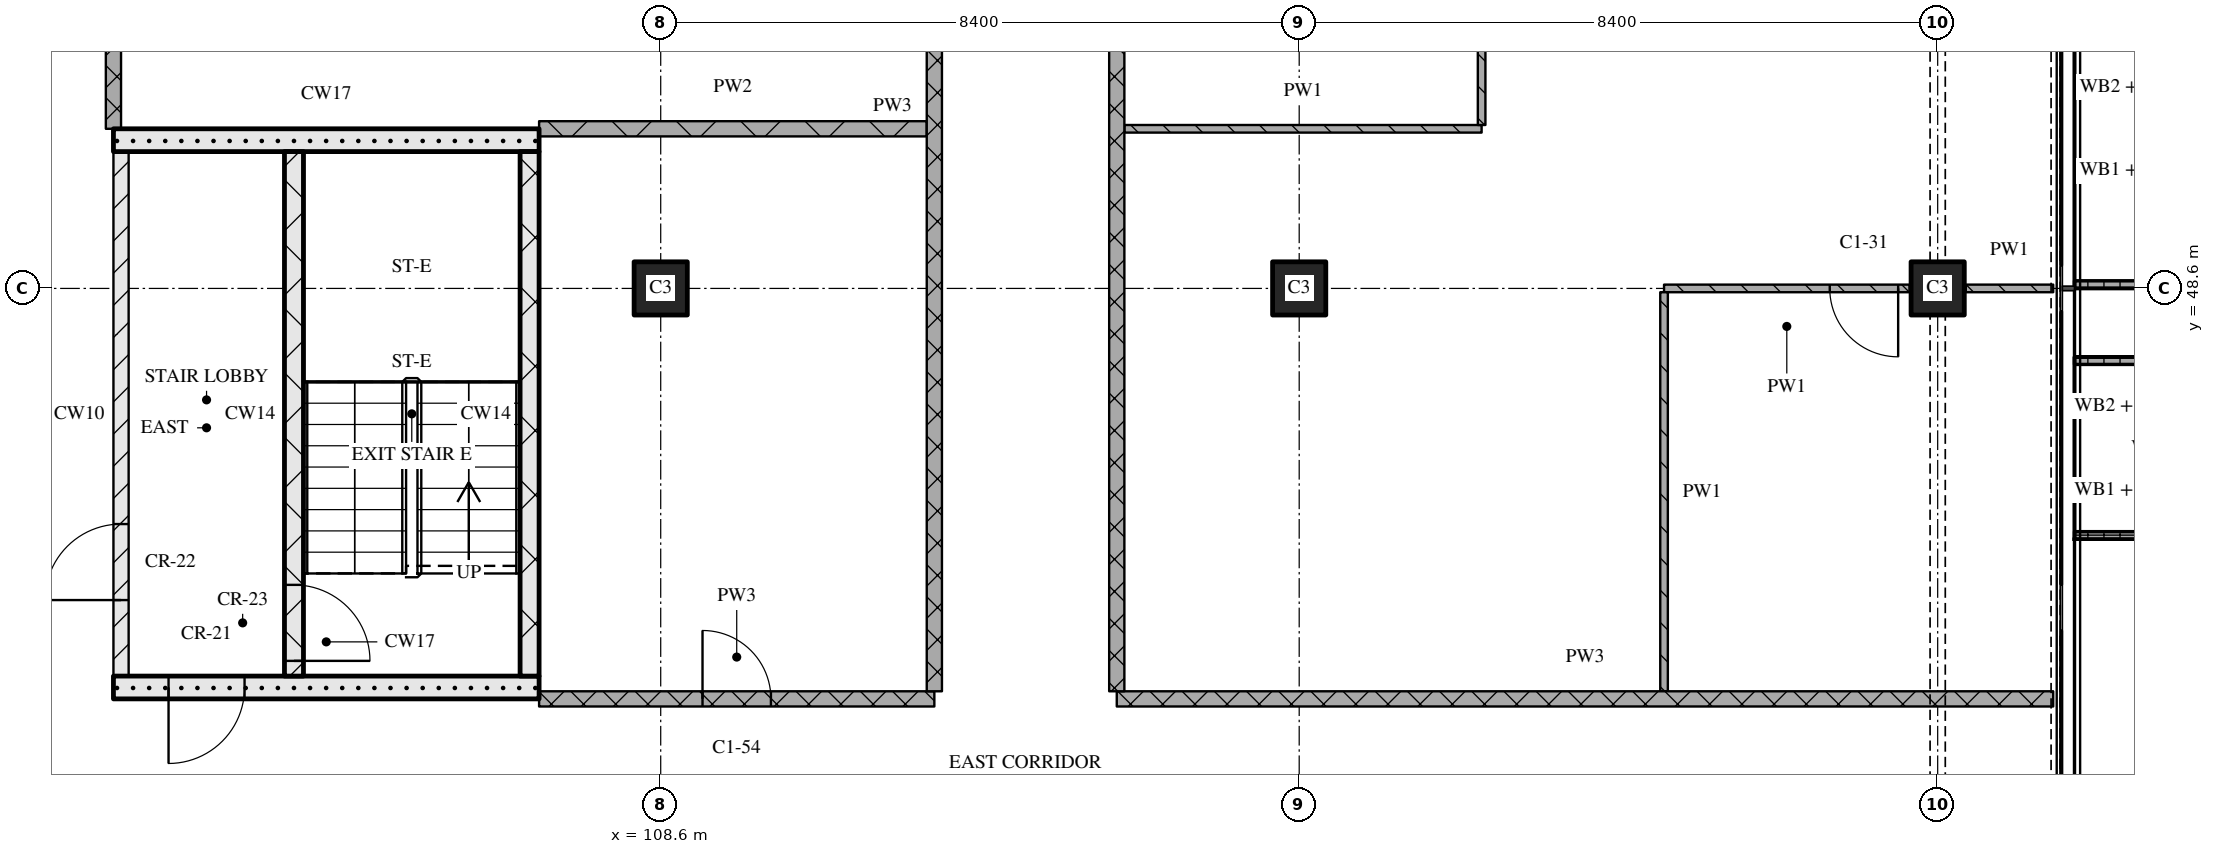
"""IFC4 building model, lengths in metres.
Left out: names, types, materials, properties, quantities, classifications, styles, units other than length and angle.
Written with IfcOpenShell. Run it as: python <this file> out.ifc"""

import sys

from ifc_helpers import new_model, si_unit, direction, frame, frame_2d, origin, origin_2d, place, context, subcontext, project, spatial, polyline, rectangle, outline, extrude, element, fill, save


model = new_model("IFC4")
c1 = context("Model", 3, precision=1e-05, world=origin(), true_north=direction((0.0, 1.0)))
c2 = subcontext(c1, "Body", "Model", "MODEL_VIEW")
j1 = project(units=[si_unit("LENGTHUNIT", "METRE"), si_unit("PLANEANGLEUNIT", "RADIAN")], contexts=[c1])
p1 = place(None, origin())
s1 = spatial("IfcSite", under=j1, at=p1, CompositionType="ELEMENT")
p2 = place(p1, origin())
s2 = spatial("IfcBuilding", under=s1, at=p2, CompositionType="ELEMENT")
p3 = place(p2, frame((0.0, 0.0, 154.65)))
s3 = spatial("IfcBuildingStorey", under=s2, at=p3, CompositionType="ELEMENT", Elevation=154.65)
for number, where, z_axis, x_axis in (
    (1, (108.6, 48.6, 0.0), (0.0, 0.0, 1.0), (1.0, 0.0, 0.0)),
    (2, (117.0, 48.6, 0.0), (0.0, 0.0, 1.0), (1.0, 0.0, 0.0)),
    (3, (125.4, 48.6, 0.0), (0.0, 0.0, 1.0), (1.0, 0.0, 0.0)),
):
    element("IfcColumn", number, at=place(p3, frame(where, z_axis=z_axis, x_axis=x_axis)), inside=s3, PredefinedType="COLUMN", context=c2, shape_type="SweptSolid", body=[
        extrude(rectangle(XDim=0.7, YDim=0.7, at=origin_2d()), origin(), (0.0, 0.0, 1.0), 3.6),
    ])
p4 = place(p3, origin())
e4 = element("IfcWall", 4, at=p4, inside=s3, PredefinedType="SOLIDWALL", context=c2, shape_type="SweptSolid", body=[
    extrude(outline(polyline([(127.2, 45.3), (127.2, 45.4), (128.7, 45.4), (128.7, 47.6), (127.2, 47.6), (127.2, 47.7), (128.8, 47.7), (128.8, 45.3), (127.2, 45.3)])), origin(), (0.0, 0.0, 1.0), 1.0),
])
p5 = place(p3, origin())
e5 = element("IfcWall", 5, at=p5, inside=s3, PredefinedType="SOLIDWALL", context=c2, shape_type="SweptSolid", body=[
    extrude(outline(polyline([(127.2, 48.6), (127.2, 48.7), (128.833, 48.7), (128.833, 52.7), (127.2, 52.7), (127.2, 52.8), (128.933, 52.8), (128.933, 48.6), (127.2, 48.6)])), origin(), (0.0, 0.0, 1.0), 1.0),
])
p6 = place(p3, frame((101.4, 43.35, 0.0), z_axis=(0.0, 0.0, 1.0), x_axis=(1.0, 0.0, 0.0)))
e6 = element("IfcWall", 6, at=p6, inside=s3, PredefinedType="SOLIDWALL", context=c2, shape_type="SweptSolid", body=[
    extrude(rectangle(XDim=5.6, YDim=0.3, at=frame_2d((2.8, 0.0))), origin(), (0.0, 0.0, 1.0), 3.32),
])
p7 = place(p6, frame((0.725, 0.0, 0.0)))
e7 = element("IfcOpeningElement", 7, at=p7, cuts=e6, PredefinedType="OPENING", context=c2, shape_type="SweptSolid", body=[
    extrude(rectangle(XDim=1.0, YDim=2.1, at=frame_2d((0.5, 1.05))), frame((0.0, 0.16, 0.0), z_axis=(0.0, -1.0, 0.0), x_axis=(1.0, 0.0, 0.0)), (0.0, 0.0, 1.0), 0.32),
])
p8 = place(p3, frame((101.5, 43.5, 0.0), z_axis=(0.0, 0.0, 1.0), x_axis=(0.0, 1.0, 0.0)))
e8 = element("IfcWall", 8, at=p8, inside=s3, PredefinedType="PARTITIONING", context=c2, shape_type="SweptSolid", body=[
    extrude(rectangle(XDim=6.9, YDim=0.2, at=frame_2d((3.45, 0.0))), origin(), (0.0, 0.0, 1.0), 3.32),
])
p9 = place(p8, frame((1.0, 0.0, 0.0)))
e9 = element("IfcOpeningElement", 9, at=p9, cuts=e8, PredefinedType="OPENING", context=c2, shape_type="SweptSolid", body=[
    extrude(rectangle(XDim=1.0, YDim=2.1, at=frame_2d((0.5, 1.05))), frame((0.0, 0.11, 0.0), z_axis=(0.0, -1.0, 0.0), x_axis=(1.0, 0.0, 0.0)), (0.0, 0.0, 1.0), 0.22),
])
p10 = place(p3, frame((103.775, 43.5, 0.0), z_axis=(0.0, 0.0, 1.0), x_axis=(0.0, 1.0, 0.0)))
e10 = element("IfcWall", 10, at=p10, inside=s3, PredefinedType="SOLIDWALL", context=c2, shape_type="SweptSolid", body=[
    extrude(rectangle(XDim=6.9, YDim=0.25, at=frame_2d((3.45, 0.0))), origin(), (0.0, 0.0, 1.0), 3.32),
])
p11 = place(p10, frame((0.2, 0.0, 0.0)))
e11 = element("IfcOpeningElement", 11, at=p11, cuts=e10, PredefinedType="OPENING", context=c2, shape_type="SweptSolid", body=[
    extrude(rectangle(XDim=1.0, YDim=2.1, at=frame_2d((0.5, 1.05))), frame((0.0, 0.135, 0.0), z_axis=(0.0, -1.0, 0.0), x_axis=(1.0, 0.0, 0.0)), (0.0, 0.0, 1.0), 0.27),
])
p12 = place(p3, frame((106.875, 43.5, 0.0), z_axis=(0.0, 0.0, 1.0), x_axis=(0.0, 1.0, 0.0)))
e12 = element("IfcWall", 12, at=p12, inside=s3, PredefinedType="SOLIDWALL", context=c2, shape_type="SweptSolid", body=[
    extrude(rectangle(XDim=6.9, YDim=0.25, at=frame_2d((3.45, 0.0))), origin(), (0.0, 0.0, 1.0), 3.32),
])
p13 = place(p3, frame((101.4, 50.55, 0.0), z_axis=(0.0, 0.0, 1.0), x_axis=(1.0, 0.0, 0.0)))
e13 = element("IfcWall", 13, at=p13, inside=s3, PredefinedType="SOLIDWALL", context=c2, shape_type="SweptSolid", body=[
    extrude(rectangle(XDim=5.6, YDim=0.3, at=frame_2d((2.8, 0.0))), origin(), (0.0, 0.0, 1.0), 3.32),
])
p14 = place(p3, frame((107.0, 43.2, 0.0), z_axis=(0.0, 0.0, 1.0), x_axis=(1.0, 0.0, 0.0)))
e14 = element("IfcWall", 14, at=p14, inside=s3, PredefinedType="PARTITIONING", context=c2, shape_type="SweptSolid", body=[
    extrude(rectangle(XDim=5.2, YDim=0.2, at=frame_2d((2.6, 0.0))), origin(), (0.0, 0.0, 1.0), 3.32),
])
p15 = place(p14, frame((2.15, 0.0, 0.0)))
e15 = element("IfcOpeningElement", 15, at=p15, cuts=e14, PredefinedType="OPENING", context=c2, shape_type="SweptSolid", body=[
    extrude(rectangle(XDim=0.9, YDim=2.1, at=frame_2d((0.45, 1.05))), frame((0.0, 0.11, 0.0), z_axis=(0.0, -1.0, 0.0), x_axis=(1.0, 0.0, 0.0)), (0.0, 0.0, 1.0), 0.22),
])
p16 = place(p3, frame((114.6, 43.2, 0.0), z_axis=(0.0, 0.0, 1.0), x_axis=(1.0, 0.0, 0.0)))
e16 = element("IfcWall", 16, at=p16, inside=s3, PredefinedType="PARTITIONING", context=c2, shape_type="SweptSolid", body=[
    extrude(rectangle(XDim=12.32, YDim=0.2, at=frame_2d((6.16, 0.0))), origin(), (0.0, 0.0, 1.0), 3.32),
])
p17 = place(p3, frame((125.03, 48.6, 0.0), z_axis=(0.0, 0.0, 1.0), x_axis=(-1.0, 0.0, 0.0)))
e17 = element("IfcWall", 17, at=p17, inside=s3, PredefinedType="PARTITIONING", context=c2, shape_type="SweptSolid", body=[
    extrude(rectangle(XDim=3.23, YDim=0.1, at=frame_2d((1.615, 0.0))), origin(), (0.0, 0.0, 1.0), 3.32),
])
p18 = place(p17, frame((0.15, 0.0, 0.0)))
e18 = element("IfcOpeningElement", 18, at=p18, cuts=e17, PredefinedType="OPENING", context=c2, shape_type="SweptSolid", body=[
    extrude(rectangle(XDim=0.9, YDim=2.1, at=frame_2d((0.45, 1.05))), frame((0.0, 0.06, 0.0), z_axis=(0.0, -1.0, 0.0), x_axis=(1.0, 0.0, 0.0)), (0.0, 0.0, 1.0), 0.12),
])
p19 = place(p3, frame((125.77, 48.6, 0.0), z_axis=(0.0, 0.0, 1.0), x_axis=(1.0, 0.0, 0.0)))
e19 = element("IfcWall", 19, at=p19, inside=s3, PredefinedType="PARTITIONING", context=c2, shape_type="SweptSolid", body=[
    extrude(rectangle(XDim=1.15, YDim=0.1, at=frame_2d((0.575, 0.0))), origin(), (0.0, 0.0, 1.0), 3.32),
])
p20 = place(p3, frame((107.0, 50.7, 0.0), z_axis=(0.0, 0.0, 1.0), x_axis=(1.0, 0.0, 0.0)))
e20 = element("IfcWall", 20, at=p20, inside=s3, PredefinedType="PARTITIONING", context=c2, shape_type="SweptSolid", body=[
    extrude(rectangle(XDim=5.1, YDim=0.2, at=frame_2d((2.55, 0.0))), origin(), (0.0, 0.0, 1.0), 3.32),
])
p21 = place(p3, frame((114.7, 50.7, 0.0), z_axis=(0.0, 0.0, 1.0), x_axis=(1.0, 0.0, 0.0)))
e21 = element("IfcWall", 21, at=p21, inside=s3, PredefinedType="PARTITIONING", context=c2, shape_type="SweptSolid", body=[
    extrude(rectangle(XDim=4.7, YDim=0.1, at=frame_2d((2.35, 0.0))), origin(), (0.0, 0.0, 1.0), 3.32),
])
p22 = place(p3, frame((101.4, 58.7, 0.0), z_axis=(0.0, 0.0, 1.0), x_axis=(0.0, -1.0, 0.0)))
e22 = element("IfcWall", 22, at=p22, inside=s3, PredefinedType="PARTITIONING", context=c2, shape_type="SweptSolid", body=[
    extrude(rectangle(XDim=8.0, YDim=0.2, at=frame_2d((4.0, 0.0))), origin(), (0.0, 0.0, 1.0), 3.32),
])
p23 = place(p22, frame((1.225, 0.0, 0.9)))
e23 = element("IfcOpeningElement", 23, at=p23, cuts=e22, PredefinedType="OPENING", context=c2, shape_type="SweptSolid", body=[
    extrude(rectangle(XDim=1.5, YDim=1.5, at=frame_2d((0.75, 0.75))), frame((0.0, 0.11, 0.0), z_axis=(0.0, -1.0, 0.0), x_axis=(1.0, 0.0, 0.0)), (0.0, 0.0, 1.0), 0.22),
])
p24 = place(p3, frame((112.2, 43.3, 0.0), z_axis=(0.0, 0.0, 1.0), x_axis=(0.0, 1.0, 0.0)))
e24 = element("IfcWall", 24, at=p24, inside=s3, PredefinedType="PARTITIONING", context=c2, shape_type="SweptSolid", body=[
    extrude(rectangle(XDim=15.4, YDim=0.2, at=frame_2d((7.7, 0.0))), origin(), (0.0, 0.0, 1.0), 3.32),
])
p25 = place(p24, frame((11.85, 0.0, 0.0)))
e25 = element("IfcOpeningElement", 25, at=p25, cuts=e24, PredefinedType="OPENING", context=c2, shape_type="SweptSolid", body=[
    extrude(rectangle(XDim=1.0, YDim=2.1, at=frame_2d((0.5, 1.05))), frame((0.0, 0.11, 0.0), z_axis=(0.0, -1.0, 0.0), x_axis=(1.0, 0.0, 0.0)), (0.0, 0.0, 1.0), 0.22),
])
p26 = place(p3, frame((114.6, 61.1, 0.0), z_axis=(0.0, 0.0, 1.0), x_axis=(0.0, -1.0, 0.0)))
e26 = element("IfcWall", 26, at=p26, inside=s3, PredefinedType="PARTITIONING", context=c2, shape_type="SweptSolid", body=[
    extrude(rectangle(XDim=17.8, YDim=0.2, at=frame_2d((8.9, 0.0))), origin(), (0.0, 0.0, 1.0), 3.32),
])
p27 = place(p26, frame((4.65, 0.0, 0.0)))
e27 = element("IfcOpeningElement", 27, at=p27, cuts=e26, PredefinedType="OPENING", context=c2, shape_type="SweptSolid", body=[
    extrude(rectangle(XDim=1.0, YDim=2.1, at=frame_2d((0.5, 1.05))), frame((0.0, 0.11, 0.0), z_axis=(0.0, -1.0, 0.0), x_axis=(1.0, 0.0, 0.0)), (0.0, 0.0, 1.0), 0.22),
])
p28 = place(p3, frame((119.4, 55.15, 0.0), z_axis=(0.0, 0.0, 1.0), x_axis=(0.0, -1.0, 0.0)))
e28 = element("IfcWall", 28, at=p28, inside=s3, PredefinedType="PARTITIONING", context=c2, shape_type="SweptSolid", body=[
    extrude(rectangle(XDim=4.4, YDim=0.1, at=frame_2d((2.2, 0.0))), origin(), (0.0, 0.0, 1.0), 3.32),
])
p29 = place(p3, frame((121.8, 48.55, 0.0), z_axis=(0.0, 0.0, 1.0), x_axis=(0.0, -1.0, 0.0)))
e29 = element("IfcWall", 29, at=p29, inside=s3, PredefinedType="PARTITIONING", context=c2, shape_type="SweptSolid", body=[
    extrude(rectangle(XDim=5.25, YDim=0.1, at=frame_2d((2.625, 0.0))), origin(), (0.0, 0.0, 1.0), 3.32),
])
p30 = place(p7, origin())
e30 = element("IfcDoor", 30, at=p30, inside=s3, OperationType="SINGLE_SWING_RIGHT", PredefinedType="DOOR", context=c2, shape_type="SweptSolid", body=[
    extrude(rectangle(XDim=1.0, YDim=2.1, at=frame_2d((0.5, 1.05))), frame((0.0, 0.025, 0.0), z_axis=(0.0, -1.0, 0.0), x_axis=(1.0, 0.0, 0.0)), (0.0, 0.0, 1.0), 0.05),
])
fill(e7, e30)
p31 = place(p11, origin())
e31 = element("IfcDoor", 31, at=p31, inside=s3, OperationType="SINGLE_SWING_RIGHT", PredefinedType="DOOR", context=c2, shape_type="SweptSolid", body=[
    extrude(rectangle(XDim=1.0, YDim=2.1, at=frame_2d((0.5, 1.05))), frame((0.0, 0.025, 0.0), z_axis=(0.0, -1.0, 0.0), x_axis=(1.0, 0.0, 0.0)), (0.0, 0.0, 1.0), 0.05),
])
fill(e11, e31)
p32 = place(p9, origin())
e32 = element("IfcDoor", 32, at=p32, inside=s3, OperationType="SINGLE_SWING_LEFT", PredefinedType="DOOR", context=c2, shape_type="SweptSolid", body=[
    extrude(rectangle(XDim=1.0, YDim=2.1, at=frame_2d((0.5, 1.05))), frame((0.0, 0.025, 0.0), z_axis=(0.0, -1.0, 0.0), x_axis=(1.0, 0.0, 0.0)), (0.0, 0.0, 1.0), 0.05),
])
fill(e9, e32)
p33 = place(p15, origin())
e33 = element("IfcDoor", 33, at=p33, inside=s3, OperationType="SINGLE_SWING_LEFT", PredefinedType="DOOR", context=c2, shape_type="SweptSolid", body=[
    extrude(rectangle(XDim=0.9, YDim=2.1, at=frame_2d((0.45, 1.05))), frame((0.0, 0.025, 0.0), z_axis=(0.0, -1.0, 0.0), x_axis=(1.0, 0.0, 0.0)), (0.0, 0.0, 1.0), 0.05),
])
fill(e15, e33)
p34 = place(p18, origin())
e34 = element("IfcDoor", 34, at=p34, inside=s3, OperationType="SINGLE_SWING_LEFT", PredefinedType="DOOR", context=c2, shape_type="SweptSolid", body=[
    extrude(rectangle(XDim=0.9, YDim=2.1, at=frame_2d((0.45, 1.05))), frame((0.0, 0.025, 0.0), z_axis=(0.0, -1.0, 0.0), x_axis=(1.0, 0.0, 0.0)), (0.0, 0.0, 1.0), 0.05),
])
fill(e18, e34)
save(model, sys.argv[1])
